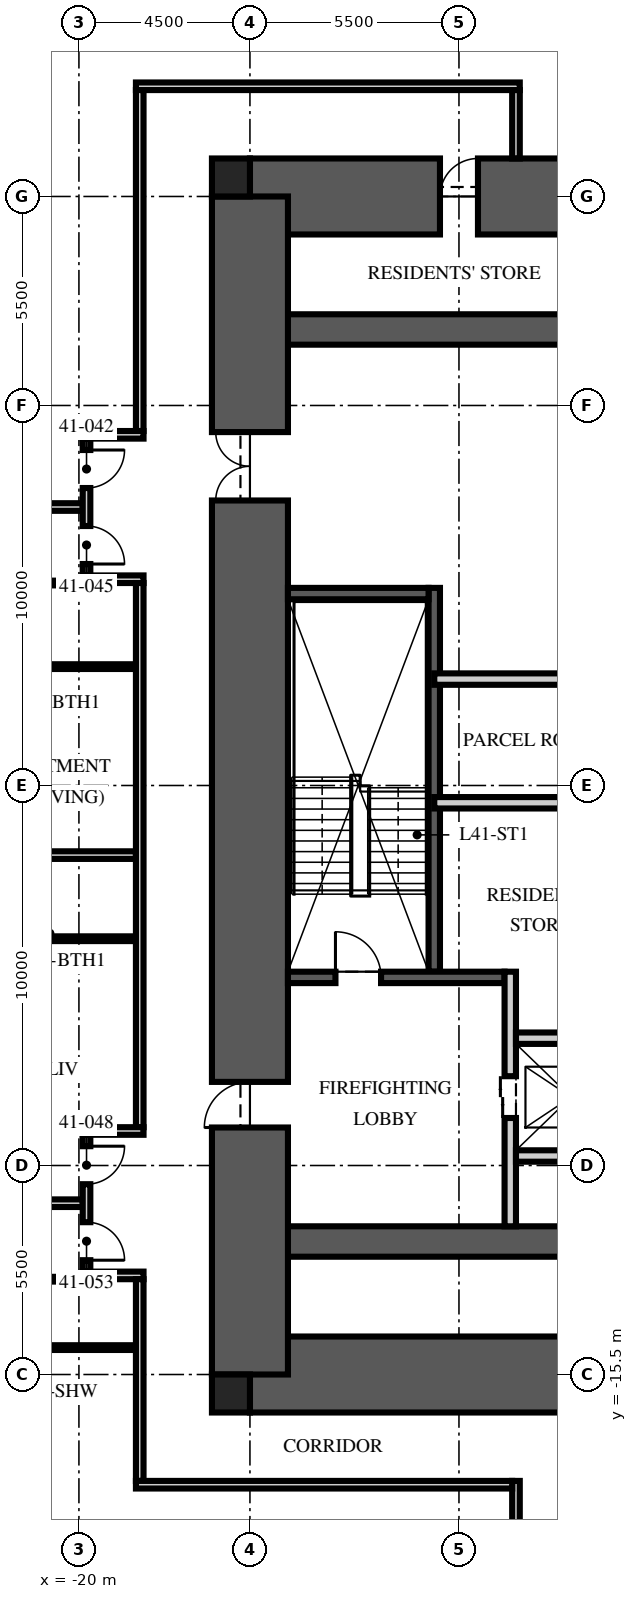
"""IFC4 building model, lengths in metres.
Left out: names, types, materials, properties, quantities, classifications, styles, units other than length and angle.
Written with IfcOpenShell. Run it as: python <this file> out.ifc"""

import sys

from ifc_helpers import new_model, si_unit, direction, frame, frame_2d, origin, origin_2d, place, context, subcontext, project, spatial, rectangle, extrude, element, fill, save


model = new_model("IFC4")
c1 = context("Model", 3, precision=1e-05, world=origin(), true_north=direction((0.0, 1.0)))
c2 = subcontext(c1, "Body", "Model", "MODEL_VIEW")
j1 = project(units=[si_unit("LENGTHUNIT", "METRE"), si_unit("PLANEANGLEUNIT", "RADIAN")], contexts=[c1])
p1 = place(None, origin())
s1 = spatial("IfcSite", under=j1, at=p1, CompositionType="ELEMENT")
p2 = place(p1, origin())
s2 = spatial("IfcBuilding", under=s1, at=p2, CompositionType="ELEMENT")
p3 = place(p2, frame((0.0, 0.0, 163.5)))
s3 = spatial("IfcBuildingStorey", under=s2, at=p3, CompositionType="ELEMENT", Elevation=163.5)
p4 = place(p3, frame((-15.5, 15.5, -0.25), z_axis=(0.0, 0.0, 1.0), x_axis=(1.0, 0.0, 0.0)))
e1 = element("IfcWall", 1, at=p4, inside=s3, PredefinedType="SHEAR", context=c2, shape_type="SweptSolid", body=[
    extrude(rectangle(XDim=31.0, YDim=2.0, at=frame_2d((15.5, 0.0))), origin(), (0.0, 0.0, 1.0), 3.75),
])
p5 = place(p4, frame((5.0, 0.0, 0.25)))
e2 = element("IfcOpeningElement", 2, at=p5, cuts=e1, PredefinedType="OPENING", context=c2, shape_type="SweptSolid", body=[
    extrude(rectangle(XDim=1.0, YDim=2.1, at=frame_2d((0.5, 1.05))), frame((0.0, 1.01, 0.0), z_axis=(0.0, -1.0, 0.0), x_axis=(1.0, 0.0, 0.0)), (0.0, 0.0, 1.0), 2.02),
])
p6 = place(p3, frame((-15.5, -15.5, -0.25), z_axis=(0.0, 0.0, 1.0), x_axis=(1.0, 0.0, 0.0)))
e3 = element("IfcWall", 3, at=p6, inside=s3, PredefinedType="SHEAR", context=c2, shape_type="SweptSolid", body=[
    extrude(rectangle(XDim=31.0, YDim=2.0, at=frame_2d((15.5, 0.0))), origin(), (0.0, 0.0, 1.0), 3.75),
])
p7 = place(p6, frame((10.4, 0.0, 0.25)))
e4 = element("IfcOpeningElement", 4, at=p7, cuts=e3, PredefinedType="OPENING", context=c2, shape_type="SweptSolid", body=[
    extrude(rectangle(XDim=1.1, YDim=2.1, at=frame_2d((0.55, 1.05))), frame((0.0, 1.01, 0.0), z_axis=(0.0, -1.0, 0.0), x_axis=(1.0, 0.0, 0.0)), (0.0, 0.0, 1.0), 2.02),
])
p8 = place(p6, frame((13.5, 0.0, 0.25)))
e5 = element("IfcOpeningElement", 5, at=p8, cuts=e3, PredefinedType="OPENING", context=c2, shape_type="SweptSolid", body=[
    extrude(rectangle(XDim=1.1, YDim=2.1, at=frame_2d((0.55, 1.05))), frame((0.0, 1.01, 0.0), z_axis=(0.0, -1.0, 0.0), x_axis=(1.0, 0.0, 0.0)), (0.0, 0.0, 1.0), 2.02),
])
p9 = place(p6, frame((16.6, 0.0, 0.25)))
e6 = element("IfcOpeningElement", 6, at=p9, cuts=e3, PredefinedType="OPENING", context=c2, shape_type="SweptSolid", body=[
    extrude(rectangle(XDim=1.1, YDim=2.1, at=frame_2d((0.55, 1.05))), frame((0.0, 1.01, 0.0), z_axis=(0.0, -1.0, 0.0), x_axis=(1.0, 0.0, 0.0)), (0.0, 0.0, 1.0), 2.02),
])
for number, where, z_axis, x_axis in (
    (7, (-15.5, 12.0, -0.25), (0.0, 0.0, 1.0), (1.0, 0.0, 0.0)),
    (8, (-15.5, -12.0, -0.25), (0.0, 0.0, 1.0), (1.0, 0.0, 0.0)),
):
    element("IfcWall", number, at=place(p3, frame(where, z_axis=z_axis, x_axis=x_axis)), inside=s3, PredefinedType="SHEAR", context=c2, shape_type="SweptSolid", body=[
        extrude(rectangle(XDim=31.0, YDim=0.8, at=frame_2d((15.5, 0.0))), origin(), (0.0, 0.0, 1.0), 3.75),
    ])
p10 = place(p3, frame((-15.5, -15.5, -0.25), z_axis=(0.0, 0.0, 1.0), x_axis=(0.0, 1.0, 0.0)))
e9 = element("IfcWall", 9, at=p10, inside=s3, PredefinedType="SHEAR", context=c2, shape_type="SweptSolid", body=[
    extrude(rectangle(XDim=31.0, YDim=2.0, at=frame_2d((15.5, 0.0))), origin(), (0.0, 0.0, 1.0), 3.75),
])
p11 = place(p10, frame((6.5, 0.0, 0.25)))
e10 = element("IfcOpeningElement", 10, at=p11, cuts=e9, PredefinedType="OPENING", context=c2, shape_type="SweptSolid", body=[
    extrude(rectangle(XDim=1.2, YDim=2.1, at=frame_2d((0.6, 1.05))), frame((0.0, 1.01, 0.0), z_axis=(0.0, -1.0, 0.0), x_axis=(1.0, 0.0, 0.0)), (0.0, 0.0, 1.0), 2.02),
])
p12 = place(p10, frame((23.0, 0.0, 0.25)))
e11 = element("IfcOpeningElement", 11, at=p12, cuts=e9, PredefinedType="OPENING", context=c2, shape_type="SweptSolid", body=[
    extrude(rectangle(XDim=1.8, YDim=2.1, at=frame_2d((0.9, 1.05))), frame((0.0, 1.01, 0.0), z_axis=(0.0, -1.0, 0.0), x_axis=(1.0, 0.0, 0.0)), (0.0, 0.0, 1.0), 2.02),
])
for number, where, z_axis, x_axis in (
    (12, (-16.0, 16.0, -0.25), (0.0, 0.0, 1.0), (1.0, 0.0, 0.0)),
    (13, (-16.0, -16.0, -0.25), (0.0, 0.0, 1.0), (1.0, 0.0, 0.0)),
):
    element("IfcColumn", number, at=place(p3, frame(where, z_axis=z_axis, x_axis=x_axis)), inside=s3, PredefinedType="COLUMN", context=c2, shape_type="SweptSolid", body=[
        extrude(rectangle(XDim=1.0, YDim=1.0, at=origin_2d()), origin(), (0.0, 0.0, 1.0), 3.75),
    ])
p13 = place(p3, frame((-10.65, -4.9, 0.0), z_axis=(0.0, 0.0, 1.0), x_axis=(0.0, 1.0, 0.0)))
e14 = element("IfcWall", 14, at=p13, inside=s3, PredefinedType="SOLIDWALL", context=c2, shape_type="SweptSolid", body=[
    extrude(rectangle(XDim=10.1, YDim=0.3, at=frame_2d((5.05, 0.0))), origin(), (0.0, 0.0, 1.0), 3.5),
])
p14 = place(p3, frame((-14.5, -5.05, 0.0), z_axis=(0.0, 0.0, 1.0), x_axis=(1.0, 0.0, 0.0)))
e15 = element("IfcWall", 15, at=p14, inside=s3, PredefinedType="SOLIDWALL", context=c2, shape_type="SweptSolid", body=[
    extrude(rectangle(XDim=5.7, YDim=0.3, at=frame_2d((2.85, 0.0))), origin(), (0.0, 0.0, 1.0), 3.5),
])
p15 = place(p14, frame((1.25, 0.0, 0.0)))
e16 = element("IfcOpeningElement", 16, at=p15, cuts=e15, PredefinedType="OPENING", context=c2, shape_type="SweptSolid", body=[
    extrude(rectangle(XDim=1.2, YDim=2.1, at=frame_2d((0.6, 1.05))), frame((0.0, 0.16, 0.0), z_axis=(0.0, -1.0, 0.0), x_axis=(1.0, 0.0, 0.0)), (0.0, 0.0, 1.0), 0.32),
])
p16 = place(p3, frame((-14.5, 5.05, 0.0), z_axis=(0.0, 0.0, 1.0), x_axis=(1.0, 0.0, 0.0)))
e17 = element("IfcWall", 17, at=p16, inside=s3, PredefinedType="SOLIDWALL", context=c2, shape_type="SweptSolid", body=[
    extrude(rectangle(XDim=3.7, YDim=0.3, at=frame_2d((1.85, 0.0))), origin(), (0.0, 0.0, 1.0), 3.5),
])
p17 = place(p3, frame((-8.65, -11.6, 0.0), z_axis=(0.0, 0.0, 1.0), x_axis=(0.0, 1.0, 0.0)))
e18 = element("IfcWall", 18, at=p17, inside=s3, PredefinedType="PARTITIONING", context=c2, shape_type="SweptSolid", body=[
    extrude(rectangle(XDim=6.7, YDim=0.3, at=frame_2d((3.35, 0.0))), origin(), (0.0, 0.0, 1.0), 3.5),
])
p18 = place(p17, frame((2.85, 0.0, 0.0)))
e19 = element("IfcOpeningElement", 19, at=p18, cuts=e18, PredefinedType="OPENING", context=c2, shape_type="SweptSolid", body=[
    extrude(rectangle(XDim=1.1, YDim=2.1, at=frame_2d((0.55, 1.05))), frame((0.0, 0.16, 0.0), z_axis=(0.0, -1.0, 0.0), x_axis=(1.0, 0.0, 0.0)), (0.0, 0.0, 1.0), 0.32),
])
p19 = place(p3, frame((-8.5, -6.65, 0.0), z_axis=(0.0, 0.0, 1.0), x_axis=(1.0, 0.0, 0.0)))
e20 = element("IfcWall", 20, at=p19, inside=s3, PredefinedType="PARTITIONING", context=c2, shape_type="SweptSolid", body=[
    extrude(rectangle(XDim=17.0, YDim=0.3, at=frame_2d((8.5, 0.0))), origin(), (0.0, 0.0, 1.0), 3.5),
])
p20 = place(p19, frame((7.8, 0.0, 0.0)))
e21 = element("IfcOpeningElement", 21, at=p20, cuts=e20, PredefinedType="OPENING", context=c2, shape_type="SweptSolid", body=[
    extrude(rectangle(XDim=1.3, YDim=2.4, at=frame_2d((0.65, 1.2))), frame((0.0, 0.16, 0.0), z_axis=(0.0, -1.0, 0.0), x_axis=(1.0, 0.0, 0.0)), (0.0, 0.0, 1.0), 0.32),
])
p21 = place(p19, frame((5.65, 0.0, 0.0)))
e22 = element("IfcOpeningElement", 22, at=p21, cuts=e20, PredefinedType="OPENING", context=c2, shape_type="SweptSolid", body=[
    extrude(rectangle(XDim=0.9, YDim=2.1, at=frame_2d((0.45, 1.05))), frame((0.0, 0.16, 0.0), z_axis=(0.0, -1.0, 0.0), x_axis=(1.0, 0.0, 0.0)), (0.0, 0.0, 1.0), 0.32),
])
p22 = place(p19, frame((10.4, 0.0, 0.0)))
e23 = element("IfcOpeningElement", 23, at=p22, cuts=e20, PredefinedType="OPENING", context=c2, shape_type="SweptSolid", body=[
    extrude(rectangle(XDim=0.9, YDim=2.1, at=frame_2d((0.45, 1.05))), frame((0.0, 0.16, 0.0), z_axis=(0.0, -1.0, 0.0), x_axis=(1.0, 0.0, 0.0)), (0.0, 0.0, 1.0), 0.32),
])
p23 = place(p3, frame((-8.5, -9.75, 0.0), z_axis=(0.0, 0.0, 1.0), x_axis=(1.0, 0.0, 0.0)))
e24 = element("IfcWall", 24, at=p23, inside=s3, PredefinedType="PARTITIONING", context=c2, shape_type="SweptSolid", body=[
    extrude(rectangle(XDim=2.9, YDim=0.3, at=frame_2d((1.45, 0.0))), origin(), (0.0, 0.0, 1.0), 3.5),
])
p24 = place(p3, frame((-10.65, 2.8, 0.0), z_axis=(0.0, 0.0, 1.0), x_axis=(1.0, 0.0, 0.0)))
e25 = element("IfcWall", 25, at=p24, inside=s3, PredefinedType="PARTITIONING", context=c2, shape_type="SweptSolid", body=[
    extrude(rectangle(XDim=21.3, YDim=0.3, at=frame_2d((10.65, 0.0))), origin(), (0.0, 0.0, 1.0), 3.5),
])
p25 = place(p24, frame((10.05, 0.0, 0.0)))
e26 = element("IfcOpeningElement", 26, at=p25, cuts=e25, PredefinedType="OPENING", context=c2, shape_type="SweptSolid", body=[
    extrude(rectangle(XDim=1.2, YDim=2.1, at=frame_2d((0.6, 1.05))), frame((0.0, 0.16, 0.0), z_axis=(0.0, -1.0, 0.0), x_axis=(1.0, 0.0, 0.0)), (0.0, 0.0, 1.0), 0.32),
])
p26 = place(p24, frame((19.121, 0.0, 0.0)))
e27 = element("IfcOpeningElement", 27, at=p26, cuts=e25, PredefinedType="OPENING", context=c2, shape_type="SweptSolid", body=[
    extrude(rectangle(XDim=0.9, YDim=2.1, at=frame_2d((0.45, 1.05))), frame((0.0, 0.16, 0.0), z_axis=(0.0, -1.0, 0.0), x_axis=(1.0, 0.0, 0.0)), (0.0, 0.0, 1.0), 0.32),
])
p27 = place(p3, frame((-10.65, -0.455, 0.0), z_axis=(0.0, 0.0, 1.0), x_axis=(1.0, 0.0, 0.0)))
e28 = element("IfcWall", 28, at=p27, inside=s3, PredefinedType="PARTITIONING", context=c2, shape_type="SweptSolid", body=[
    extrude(rectangle(XDim=5.55, YDim=0.3, at=frame_2d((2.775, 0.0))), origin(), (0.0, 0.0, 1.0), 3.5),
])
p28 = place(p3, frame((-18.5, 18.4, 0.0), z_axis=(0.0, 0.0, 1.0), x_axis=(1.0, 0.0, 0.0)))
e29 = element("IfcWall", 29, at=p28, inside=s3, PredefinedType="PARTITIONING", context=c2, shape_type="SweptSolid", body=[
    extrude(rectangle(XDim=10.1, YDim=0.2, at=frame_2d((5.05, 0.0))), origin(), (0.0, 0.0, 1.0), 2.3),
])
p29 = place(p3, frame((-8.5, 18.3, 0.0), z_axis=(0.0, 0.0, 1.0), x_axis=(0.0, -1.0, 0.0)))
e30 = element("IfcWall", 30, at=p29, inside=s3, PredefinedType="PARTITIONING", context=c2, shape_type="SweptSolid", body=[
    extrude(rectangle(XDim=1.8, YDim=0.2, at=frame_2d((0.9, 0.0))), origin(), (0.0, 0.0, 1.0), 3.5),
])
p30 = place(p3, frame((-19.9, 7.328, 0.0), z_axis=(0.0, 0.0, 1.0), x_axis=(-1.0, 0.0, 0.0)))
e31 = element("IfcWall", 31, at=p30, inside=s3, PredefinedType="PARTITIONING", context=c2, shape_type="SweptSolid", body=[
    extrude(rectangle(XDim=8.5, YDim=0.2, at=frame_2d((4.25, 0.0))), origin(), (0.0, 0.0, 1.0), 2.81),
])
p31 = place(p3, frame((-18.5, -1.832, 0.0), z_axis=(0.0, 0.0, 1.0), x_axis=(-1.0, 0.0, 0.0)))
e32 = element("IfcWall", 32, at=p31, inside=s3, PredefinedType="PARTITIONING", context=c2, shape_type="SweptSolid", body=[
    extrude(rectangle(XDim=9.9, YDim=0.2, at=frame_2d((4.95, 0.0))), origin(), (0.0, 0.0, 1.0), 2.81),
])
p32 = place(p3, frame((-19.9, -10.992, 0.0), z_axis=(0.0, 0.0, 1.0), x_axis=(-1.0, 0.0, 0.0)))
e33 = element("IfcWall", 33, at=p32, inside=s3, PredefinedType="PARTITIONING", context=c2, shape_type="SweptSolid", body=[
    extrude(rectangle(XDim=8.5, YDim=0.2, at=frame_2d((4.25, 0.0))), origin(), (0.0, 0.0, 1.0), 2.81),
])
p33 = place(p3, frame((-19.97, 5.328, 0.0), z_axis=(0.0, 0.0, 1.0), x_axis=(-1.0, 0.0, 0.0)))
e34 = element("IfcWall", 34, at=p33, inside=s3, PredefinedType="PARTITIONING", context=c2, shape_type="SweptSolid", body=[
    extrude(rectangle(XDim=2.73, YDim=0.125, at=frame_2d((1.365, 0.0))), origin(), (0.0, 0.0, 1.0), 3.5),
])
for number, where, z_axis, x_axis in (
    (35, (-18.5, 3.128, 0.0), (0.0, 0.0, 1.0), (-1.0, 0.0, 0.0)),
    (36, (-18.5, -4.032, 0.0), (0.0, 0.0, 1.0), (-1.0, 0.0, 0.0)),
):
    element("IfcWall", number, at=place(p3, frame(where, z_axis=z_axis, x_axis=x_axis)), inside=s3, PredefinedType="PARTITIONING", context=c2, shape_type="SweptSolid", body=[
        extrude(rectangle(XDim=4.2, YDim=0.125, at=frame_2d((2.1, 0.0))), origin(), (0.0, 0.0, 1.0), 3.5),
    ])
p34 = place(p3, frame((-19.97, -12.992, 0.0), z_axis=(0.0, 0.0, 1.0), x_axis=(-1.0, 0.0, 0.0)))
e37 = element("IfcWall", 37, at=p34, inside=s3, PredefinedType="PARTITIONING", context=c2, shape_type="SweptSolid", body=[
    extrude(rectangle(XDim=2.73, YDim=0.125, at=frame_2d((1.365, 0.0))), origin(), (0.0, 0.0, 1.0), 3.5),
])
p35 = place(p3, frame((-18.5, -14.792, 0.0), z_axis=(0.0, 0.0, 1.0), x_axis=(-1.0, 0.0, 0.0)))
e38 = element("IfcWall", 38, at=p35, inside=s3, PredefinedType="PARTITIONING", context=c2, shape_type="SweptSolid", body=[
    extrude(rectangle(XDim=4.2, YDim=0.125, at=frame_2d((2.1, 0.0))), origin(), (0.0, 0.0, 1.0), 3.5),
])
p36 = place(p3, frame((-18.4, 18.3, 0.0), z_axis=(0.0, 0.0, 1.0), x_axis=(0.0, -1.0, 0.0)))
e39 = element("IfcWall", 39, at=p36, inside=s3, PredefinedType="PARTITIONING", context=c2, shape_type="SweptSolid", body=[
    extrude(rectangle(XDim=8.972, YDim=0.2, at=frame_2d((4.486, 0.0))), origin(), (0.0, 0.0, 1.0), 2.3),
])
p37 = place(p3, frame((-18.3, 9.228, 0.0), z_axis=(0.0, 0.0, 1.0), x_axis=(-1.0, 0.0, 0.0)))
e40 = element("IfcWall", 40, at=p37, inside=s3, PredefinedType="PARTITIONING", context=c2, shape_type="SweptSolid", body=[
    extrude(rectangle(XDim=1.6, YDim=0.2, at=frame_2d((0.8, 0.0))), origin(), (0.0, 0.0, 1.0), 2.7),
])
p38 = place(p3, frame((-18.3, 5.428, 0.0), z_axis=(0.0, 0.0, 1.0), x_axis=(-1.0, 0.0, 0.0)))
e41 = element("IfcWall", 41, at=p38, inside=s3, PredefinedType="PARTITIONING", context=c2, shape_type="SweptSolid", body=[
    extrude(rectangle(XDim=1.6, YDim=0.2, at=frame_2d((0.8, 0.0))), origin(), (0.0, 0.0, 1.0), 3.5),
])
p39 = place(p3, frame((-19.8, 9.128, 0.0), z_axis=(0.0, 0.0, 1.0), x_axis=(0.0, -1.0, 0.0)))
e42 = element("IfcWall", 42, at=p39, inside=s3, PredefinedType="PARTITIONING", context=c2, shape_type="SweptSolid", body=[
    extrude(rectangle(XDim=3.6, YDim=0.2, at=frame_2d((1.8, 0.0))), origin(), (0.0, 0.0, 1.0), 2.7),
])
p40 = place(p39, frame((0.3, 0.0, 0.0)))
e43 = element("IfcOpeningElement", 43, at=p40, cuts=e42, PredefinedType="OPENING", context=c2, shape_type="SweptSolid", body=[
    extrude(rectangle(XDim=1.0, YDim=2.2, at=frame_2d((0.5, 1.1))), frame((0.0, 0.11, 0.0), z_axis=(0.0, -1.0, 0.0), x_axis=(1.0, 0.0, 0.0)), (0.0, 0.0, 1.0), 0.22),
])
p41 = place(p39, frame((2.3, 0.0, 0.0)))
e44 = element("IfcOpeningElement", 44, at=p41, cuts=e42, PredefinedType="OPENING", context=c2, shape_type="SweptSolid", body=[
    extrude(rectangle(XDim=1.0, YDim=2.2, at=frame_2d((0.5, 1.1))), frame((0.0, 0.11, 0.0), z_axis=(0.0, -1.0, 0.0), x_axis=(1.0, 0.0, 0.0)), (0.0, 0.0, 1.0), 0.22),
])
p42 = place(p3, frame((-18.4, 5.328, 0.0), z_axis=(0.0, 0.0, 1.0), x_axis=(0.0, -1.0, 0.0)))
e45 = element("IfcWall", 45, at=p42, inside=s3, PredefinedType="PARTITIONING", context=c2, shape_type="SweptSolid", body=[
    extrude(rectangle(XDim=14.32, YDim=0.2, at=frame_2d((7.16, 0.0))), origin(), (0.0, 0.0, 1.0), 2.7),
])
p43 = place(p3, frame((-18.3, -9.092, 0.0), z_axis=(0.0, 0.0, 1.0), x_axis=(-1.0, 0.0, 0.0)))
e46 = element("IfcWall", 46, at=p43, inside=s3, PredefinedType="PARTITIONING", context=c2, shape_type="SweptSolid", body=[
    extrude(rectangle(XDim=1.6, YDim=0.2, at=frame_2d((0.8, 0.0))), origin(), (0.0, 0.0, 1.0), 2.7),
])
p44 = place(p3, frame((-18.3, -12.892, 0.0), z_axis=(0.0, 0.0, 1.0), x_axis=(-1.0, 0.0, 0.0)))
e47 = element("IfcWall", 47, at=p44, inside=s3, PredefinedType="PARTITIONING", context=c2, shape_type="SweptSolid", body=[
    extrude(rectangle(XDim=1.6, YDim=0.2, at=frame_2d((0.8, 0.0))), origin(), (0.0, 0.0, 1.0), 3.5),
])
p45 = place(p3, frame((-19.8, -9.192, 0.0), z_axis=(0.0, 0.0, 1.0), x_axis=(0.0, -1.0, 0.0)))
e48 = element("IfcWall", 48, at=p45, inside=s3, PredefinedType="PARTITIONING", context=c2, shape_type="SweptSolid", body=[
    extrude(rectangle(XDim=3.6, YDim=0.2, at=frame_2d((1.8, 0.0))), origin(), (0.0, 0.0, 1.0), 2.7),
])
p46 = place(p45, frame((0.3, 0.0, 0.0)))
e49 = element("IfcOpeningElement", 49, at=p46, cuts=e48, PredefinedType="OPENING", context=c2, shape_type="SweptSolid", body=[
    extrude(rectangle(XDim=1.0, YDim=2.2, at=frame_2d((0.5, 1.1))), frame((0.0, 0.11, 0.0), z_axis=(0.0, -1.0, 0.0), x_axis=(1.0, 0.0, 0.0)), (0.0, 0.0, 1.0), 0.22),
])
p47 = place(p45, frame((2.3, 0.0, 0.0)))
e50 = element("IfcOpeningElement", 50, at=p47, cuts=e48, PredefinedType="OPENING", context=c2, shape_type="SweptSolid", body=[
    extrude(rectangle(XDim=1.0, YDim=2.2, at=frame_2d((0.5, 1.1))), frame((0.0, 0.11, 0.0), z_axis=(0.0, -1.0, 0.0), x_axis=(1.0, 0.0, 0.0)), (0.0, 0.0, 1.0), 0.22),
])
p48 = place(p3, frame((-18.4, -12.992, 0.0), z_axis=(0.0, 0.0, 1.0), x_axis=(0.0, -1.0, 0.0)))
e51 = element("IfcWall", 51, at=p48, inside=s3, PredefinedType="PARTITIONING", context=c2, shape_type="SweptSolid", body=[
    extrude(rectangle(XDim=5.308, YDim=0.2, at=frame_2d((2.654, 0.0))), origin(), (0.0, 0.0, 1.0), 2.3),
])
p49 = place(p3, frame((-8.5, -18.3, 0.0), z_axis=(0.0, 0.0, 1.0), x_axis=(0.0, -1.0, 0.0)))
e52 = element("IfcWall", 52, at=p49, inside=s3, PredefinedType="PARTITIONING", context=c2, shape_type="SweptSolid", body=[
    extrude(rectangle(XDim=3.0, YDim=0.2, at=frame_2d((1.5, 0.0))), origin(), (0.0, 0.0, 1.0), 3.5),
])
p50 = place(p3, frame((-8.6, -18.4, 0.0), z_axis=(0.0, 0.0, 1.0), x_axis=(-1.0, 0.0, 0.0)))
e53 = element("IfcWall", 53, at=p50, inside=s3, PredefinedType="PARTITIONING", context=c2, shape_type="SweptSolid", body=[
    extrude(rectangle(XDim=9.9, YDim=0.2, at=frame_2d((4.95, 0.0))), origin(), (0.0, 0.0, 1.0), 2.3),
])
p51 = place(p15, origin())
e54 = element("IfcDoor", 54, at=p51, inside=s3, OperationType="SINGLE_SWING_LEFT", PredefinedType="DOOR", context=c2, shape_type="SweptSolid", body=[
    extrude(rectangle(XDim=1.2, YDim=2.1, at=frame_2d((0.6, 1.05))), frame((0.0, 0.025, 0.0), z_axis=(0.0, -1.0, 0.0), x_axis=(1.0, 0.0, 0.0)), (0.0, 0.0, 1.0), 0.05),
])
fill(e16, e54)
p52 = place(p11, origin())
e55 = element("IfcDoor", 55, at=p52, inside=s3, OperationType="SINGLE_SWING_LEFT", PredefinedType="DOOR", context=c2, shape_type="SweptSolid", body=[
    extrude(rectangle(XDim=1.2, YDim=2.1, at=frame_2d((0.6, 1.05))), frame((0.0, 0.025, 0.0), z_axis=(0.0, -1.0, 0.0), x_axis=(1.0, 0.0, 0.0)), (0.0, 0.0, 1.0), 0.05),
])
fill(e10, e55)
p53 = place(p12, origin())
e56 = element("IfcDoor", 56, at=p53, inside=s3, OperationType="DOUBLE_DOOR_SINGLE_SWING", PredefinedType="DOOR", context=c2, shape_type="SweptSolid", body=[
    extrude(rectangle(XDim=1.8, YDim=2.1, at=frame_2d((0.9, 1.05))), frame((0.0, 0.025, 0.0), z_axis=(0.0, -1.0, 0.0), x_axis=(1.0, 0.0, 0.0)), (0.0, 0.0, 1.0), 0.05),
])
fill(e11, e56)
p54 = place(p18, origin())
e57 = element("IfcDoor", 57, at=p54, inside=s3, OperationType="DOUBLE_DOOR_SLIDING", PredefinedType="DOOR", context=c2, shape_type="SweptSolid", body=[
    extrude(rectangle(XDim=1.1, YDim=2.1, at=frame_2d((0.55, 1.05))), frame((0.0, 0.025, 0.0), z_axis=(0.0, -1.0, 0.0), x_axis=(1.0, 0.0, 0.0)), (0.0, 0.0, 1.0), 0.05),
])
fill(e19, e57)
p55 = place(p5, origin())
e58 = element("IfcDoor", 58, at=p55, inside=s3, OperationType="SINGLE_SWING_RIGHT", PredefinedType="DOOR", context=c2, shape_type="SweptSolid", body=[
    extrude(rectangle(XDim=1.0, YDim=2.1, at=frame_2d((0.5, 1.05))), frame((0.0, 0.025, 0.0), z_axis=(0.0, -1.0, 0.0), x_axis=(1.0, 0.0, 0.0)), (0.0, 0.0, 1.0), 0.05),
])
fill(e2, e58)
p56 = place(p40, origin())
e59 = element("IfcDoor", 59, at=p56, inside=s3, OperationType="SINGLE_SWING_LEFT", PredefinedType="DOOR", context=c2, shape_type="SweptSolid", body=[
    extrude(rectangle(XDim=1.0, YDim=2.2, at=frame_2d((0.5, 1.1))), frame((0.0, 0.025, 0.0), z_axis=(0.0, -1.0, 0.0), x_axis=(1.0, 0.0, 0.0)), (0.0, 0.0, 1.0), 0.05),
])
fill(e43, e59)
p57 = place(p41, origin())
e60 = element("IfcDoor", 60, at=p57, inside=s3, OperationType="SINGLE_SWING_RIGHT", PredefinedType="DOOR", context=c2, shape_type="SweptSolid", body=[
    extrude(rectangle(XDim=1.0, YDim=2.2, at=frame_2d((0.5, 1.1))), frame((0.0, 0.025, 0.0), z_axis=(0.0, -1.0, 0.0), x_axis=(1.0, 0.0, 0.0)), (0.0, 0.0, 1.0), 0.05),
])
fill(e44, e60)
p58 = place(p46, origin())
e61 = element("IfcDoor", 61, at=p58, inside=s3, OperationType="SINGLE_SWING_LEFT", PredefinedType="DOOR", context=c2, shape_type="SweptSolid", body=[
    extrude(rectangle(XDim=1.0, YDim=2.2, at=frame_2d((0.5, 1.1))), frame((0.0, 0.025, 0.0), z_axis=(0.0, -1.0, 0.0), x_axis=(1.0, 0.0, 0.0)), (0.0, 0.0, 1.0), 0.05),
])
fill(e49, e61)
p59 = place(p47, origin())
e62 = element("IfcDoor", 62, at=p59, inside=s3, OperationType="SINGLE_SWING_RIGHT", PredefinedType="DOOR", context=c2, shape_type="SweptSolid", body=[
    extrude(rectangle(XDim=1.0, YDim=2.2, at=frame_2d((0.5, 1.1))), frame((0.0, 0.025, 0.0), z_axis=(0.0, -1.0, 0.0), x_axis=(1.0, 0.0, 0.0)), (0.0, 0.0, 1.0), 0.05),
])
fill(e50, e62)
save(model, sys.argv[1])
